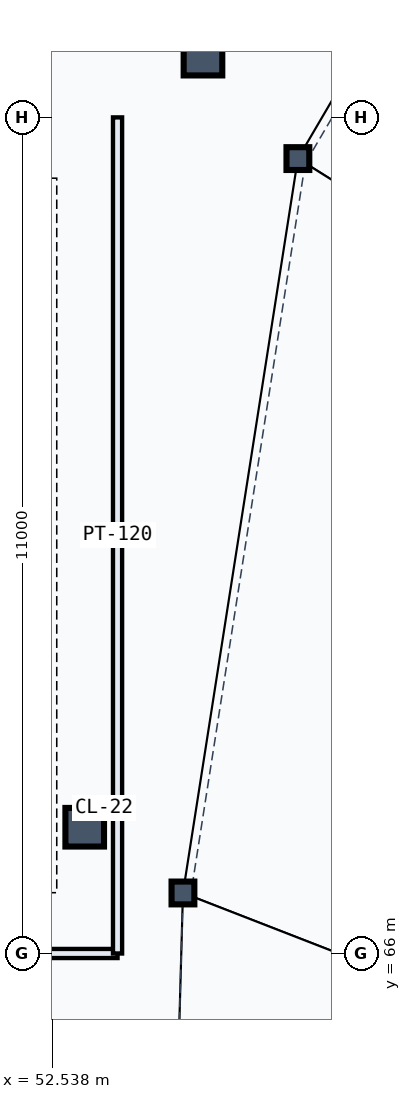
"""IFC4 building model, lengths in metres.
Left out: names, types, materials, properties, quantities, classifications, styles, units other than length and angle.
Written with IfcOpenShell. Run it as: python <this file> out.ifc"""

import sys

from ifc_helpers import new_model, si_unit, direction, frame, frame_2d, origin, origin_2d, place, context, subcontext, project, spatial, rectangle, hollow_rectangle, hollow_circle, extrude, element, save


model = new_model("IFC4")
c1 = context("Model", 3, precision=1e-05, world=origin(), true_north=direction((0.0, 1.0)))
c2 = subcontext(c1, "Body", "Model", "MODEL_VIEW")
j1 = project(units=[si_unit("LENGTHUNIT", "METRE"), si_unit("PLANEANGLEUNIT", "RADIAN")], contexts=[c1])
p1 = place(None, origin())
s1 = spatial("IfcSite", under=j1, at=p1, CompositionType="ELEMENT")
p2 = place(p1, origin())
s2 = spatial("IfcBuilding", under=s1, at=p2, CompositionType="ELEMENT")
p3 = place(p2, frame((0.0, 0.0, 14.7)))
s3 = spatial("IfcBuildingStorey", under=s2, at=p3, CompositionType="ELEMENT", Elevation=14.7)
for number, where, z_axis, x_axis in (
    (1, (54.524, 77.806, 0.0), (0.0, 0.0, 1.0), (1.0, 0.0, 0.0)),
    (2, (52.968, 67.661, 0.0), (0.0, 0.0, 1.0), (1.0, 0.0, 0.0)),
):
    element("IfcColumn", number, at=place(p3, frame(where, z_axis=z_axis, x_axis=x_axis)), inside=s3, PredefinedType="COLUMN", context=c2, shape_type="SweptSolid", body=[
        extrude(hollow_circle(Radius=0.254, WallThickness=0.02, at=origin_2d()), origin(), (0.0, 0.0, 1.0), 4.8),
    ])
for number, where, z_axis, x_axis in (
    (3, (55.773, 76.458, 0.0), (0.0, 0.0, 1.0), (1.0, 0.0, 0.0)),
    (4, (54.26, 66.796, 0.0), (0.0, 0.0, 1.0), (1.0, 0.0, 0.0)),
):
    element("IfcColumn", number, at=place(p3, frame(where, z_axis=z_axis, x_axis=x_axis)), inside=s3, PredefinedType="COLUMN", context=c2, shape_type="SweptSolid", body=[
        extrude(hollow_rectangle(XDim=0.3, YDim=0.3, WallThickness=0.016, at=origin_2d()), origin(), (0.0, 0.0, 1.0), 1.22),
    ])
p4 = place(p3, frame((49.883, 66.0, 0.0), z_axis=(0.0, 0.0, 1.0), x_axis=(1.0, 0.0, 0.0)))
e5 = element("IfcWall", 5, at=p4, inside=s3, PredefinedType="PARTITIONING", context=c2, shape_type="SweptSolid", body=[
    extrude(rectangle(XDim=3.517, YDim=0.12, at=frame_2d((1.758, 0.0))), origin(), (0.0, 0.0, 1.0), 3.778),
])
p5 = place(p4, frame((1.208, 0.0, 0.0)))
e6 = element("IfcOpeningElement", 6, at=p5, cuts=e5, PredefinedType="OPENING", context=c2, shape_type="SweptSolid", body=[
    extrude(rectangle(XDim=1.1, YDim=2.1, at=frame_2d((0.55, 1.05))), frame((0.0, 0.07, 0.0), z_axis=(0.0, -1.0, 0.0), x_axis=(1.0, 0.0, 0.0)), (0.0, 0.0, 1.0), 0.14),
])
p6 = place(p3, frame((53.4, 66.0, 0.0), z_axis=(0.0, 0.0, 1.0), x_axis=(0.0, 1.0, 0.0)))
e7 = element("IfcWall", 7, at=p6, inside=s3, PredefinedType="PARTITIONING", context=c2, shape_type="SweptSolid", body=[
    extrude(rectangle(XDim=11.0, YDim=0.12, at=frame_2d((5.5, 0.0))), origin(), (0.0, 0.0, 1.0), 3.778),
])
save(model, sys.argv[1])
